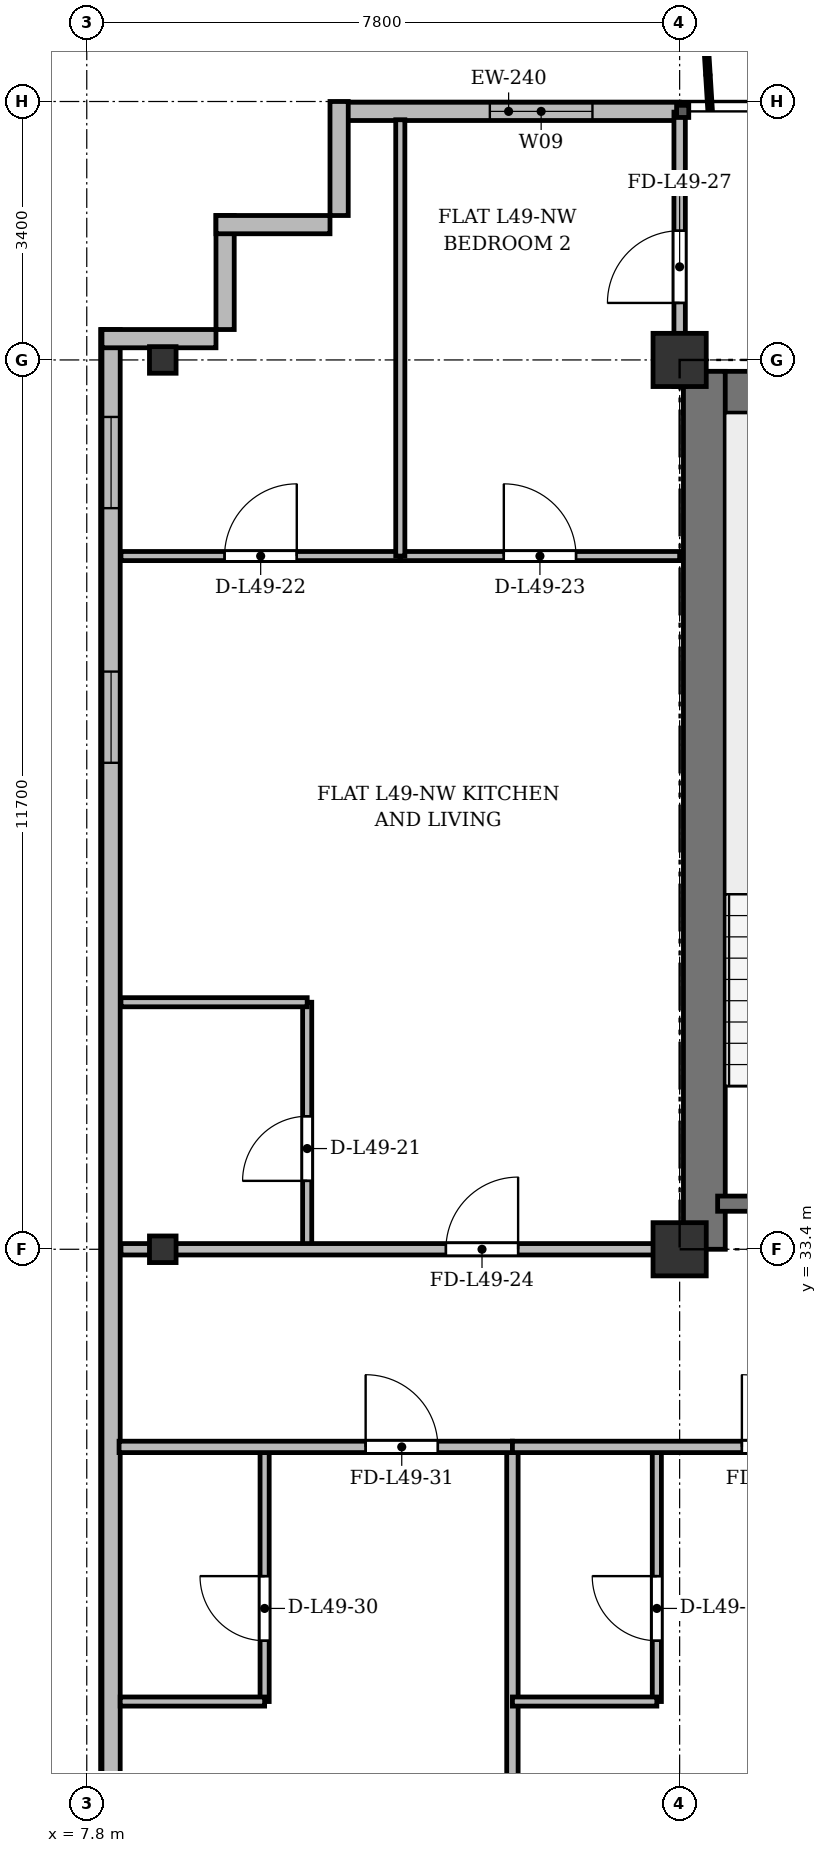
"""IFC4 building model, lengths in metres.
Left out: names, types, materials, properties, quantities, classifications, styles, units other than length and angle.
Written with IfcOpenShell. Run it as: python <this file> out.ifc"""

import sys

from ifc_helpers import new_model, si_unit, direction, frame, frame_2d, origin, origin_2d, place, context, subcontext, project, spatial, rectangle, i_section, extrude, source, transform, mapped, element, fill, save


model = new_model("IFC4")
c1 = context("Model", 3, precision=1e-05, world=origin(), true_north=direction((0.0, 1.0)))
c2 = subcontext(c1, "Body", "Model", "MODEL_VIEW")
j1 = project(units=[si_unit("LENGTHUNIT", "METRE"), si_unit("PLANEANGLEUNIT", "RADIAN")], contexts=[c1])
p1 = place(None, origin())
s1 = spatial("IfcSite", under=j1, at=p1, CompositionType="ELEMENT")
p2 = place(p1, origin())
s2 = spatial("IfcBuilding", under=s1, at=p2, CompositionType="ELEMENT")
p3 = place(p2, frame((0.0, 0.0, 190.5)))
s3 = spatial("IfcBuildingStorey", under=s2, at=p3, CompositionType="ELEMENT", Elevation=190.5)
m1 = source(origin(), c2, "Body", "SweptSolid", [
    extrude(i_section(OverallWidth=0.35, OverallDepth=0.35, WebThickness=0.018, FlangeThickness=0.028, at=origin_2d()), origin(), (0.0, 0.0, 1.0), 3.6),
])
for number, where, z_axis, x_axis in (
    (1, (8.8, 33.4, 0.0), (0.0, 0.0, 1.0), (1.0, 0.0, 0.0)),
    (2, (8.8, 45.1, 0.0), (0.0, 0.0, 1.0), (1.0, 0.0, 0.0)),
):
    element("IfcColumn", number, at=place(p3, frame(where, z_axis=z_axis, x_axis=x_axis)), inside=s3, PredefinedType="COLUMN", context=c2, shape_type="MappedRepresentation", body=[
        mapped(m1, transform((0.0, 0.0, 0.0), x_axis=(1.0, 0.0, 0.0), y_axis=(0.0, 1.0, 0.0), z_axis=(0.0, 0.0, 1.0), scale=1.0)),
    ])
m2 = source(origin(), c2, "Body", "SweptSolid", [
    extrude(rectangle(XDim=0.7, YDim=0.7, at=origin_2d()), origin(), (0.0, 0.0, 1.0), 3.6),
])
for number, where, z_axis, x_axis in (
    (3, (15.6, 33.4, 0.0), (0.0, 0.0, 1.0), (1.0, 0.0, 0.0)),
    (4, (15.6, 45.1, 0.0), (0.0, 0.0, 1.0), (1.0, 0.0, 0.0)),
):
    element("IfcColumn", number, at=place(p3, frame(where, z_axis=z_axis, x_axis=x_axis)), inside=s3, PredefinedType="COLUMN", context=c2, shape_type="MappedRepresentation", body=[
        mapped(m2, transform((0.0, 0.0, 0.0), x_axis=(1.0, 0.0, 0.0), y_axis=(0.0, 1.0, 0.0), z_axis=(0.0, 0.0, 1.0), scale=1.0)),
    ])
p4 = place(p3, frame((11.1, 48.37, 0.0), z_axis=(0.0, 0.0, 1.0), x_axis=(1.0, 0.0, 0.0)))
e5 = element("IfcWall", 5, at=p4, inside=s3, PredefinedType="SOLIDWALL", context=c2, shape_type="SweptSolid", body=[
    extrude(rectangle(XDim=4.5, YDim=0.24, at=frame_2d((2.25, 0.0))), origin(), (0.0, 0.0, 1.0), 3.36),
])
p5 = place(p4, frame((2.003, 0.0, 0.9)))
e6 = element("IfcOpeningElement", 6, at=p5, cuts=e5, PredefinedType="OPENING", context=c2, shape_type="SweptSolid", body=[
    extrude(rectangle(XDim=1.35, YDim=1.5, at=frame_2d((0.675, 0.75))), frame((0.0, 0.13, 0.0), z_axis=(0.0, -1.0, 0.0), x_axis=(1.0, 0.0, 0.0)), (0.0, 0.0, 1.0), 0.26),
])
p6 = place(p3, frame((8.12, 6.4, 0.0), z_axis=(0.0, 0.0, 1.0), x_axis=(0.0, 1.0, 0.0)))
e7 = element("IfcWall", 7, at=p6, inside=s3, PredefinedType="SOLIDWALL", context=c2, shape_type="SweptSolid", body=[
    extrude(rectangle(XDim=39.1, YDim=0.24, at=frame_2d((19.55, 0.0))), origin(), (0.0, 0.0, 1.0), 3.36),
])
p7 = place(p6, frame((1.45, 0.0, 0.92)))
e8 = element("IfcOpeningElement", 8, at=p7, cuts=e7, PredefinedType="OPENING", context=c2, shape_type="SweptSolid", body=[
    extrude(rectangle(XDim=1.2, YDim=1.65, at=frame_2d((0.6, 0.825))), frame((0.0, 0.13, 0.0), z_axis=(0.0, -1.0, 0.0), x_axis=(1.0, 0.0, 0.0)), (0.0, 0.0, 1.0), 0.26),
])
p8 = place(p6, frame((3.8, 0.0, 0.92)))
e9 = element("IfcOpeningElement", 9, at=p8, cuts=e7, PredefinedType="OPENING", context=c2, shape_type="SweptSolid", body=[
    extrude(rectangle(XDim=2.4, YDim=2.1, at=frame_2d((1.2, 1.05))), frame((0.0, 0.13, 0.0), z_axis=(0.0, -1.0, 0.0), x_axis=(1.0, 0.0, 0.0)), (0.0, 0.0, 1.0), 0.26),
])
p9 = place(p6, frame((8.0, 0.0, 0.92)))
e10 = element("IfcOpeningElement", 10, at=p9, cuts=e7, PredefinedType="OPENING", context=c2, shape_type="SweptSolid", body=[
    extrude(rectangle(XDim=2.4, YDim=2.1, at=frame_2d((1.2, 1.05))), frame((0.0, 0.13, 0.0), z_axis=(0.0, -1.0, 0.0), x_axis=(1.0, 0.0, 0.0)), (0.0, 0.0, 1.0), 0.26),
])
p10 = place(p6, frame((15.2, 0.0, 0.92)))
e11 = element("IfcOpeningElement", 11, at=p10, cuts=e7, PredefinedType="OPENING", context=c2, shape_type="SweptSolid", body=[
    extrude(rectangle(XDim=2.4, YDim=2.1, at=frame_2d((1.2, 1.05))), frame((0.0, 0.13, 0.0), z_axis=(0.0, -1.0, 0.0), x_axis=(1.0, 0.0, 0.0)), (0.0, 0.0, 1.0), 0.26),
])
p11 = place(p6, frame((33.4, 0.0, 0.92)))
e12 = element("IfcOpeningElement", 12, at=p11, cuts=e7, PredefinedType="OPENING", context=c2, shape_type="SweptSolid", body=[
    extrude(rectangle(XDim=1.2, YDim=1.65, at=frame_2d((0.6, 0.825))), frame((0.0, 0.13, 0.0), z_axis=(0.0, -1.0, 0.0), x_axis=(1.0, 0.0, 0.0)), (0.0, 0.0, 1.0), 0.26),
])
p12 = place(p6, frame((36.75, 0.0, 0.92)))
e13 = element("IfcOpeningElement", 13, at=p12, cuts=e7, PredefinedType="OPENING", context=c2, shape_type="SweptSolid", body=[
    extrude(rectangle(XDim=1.2, YDim=1.65, at=frame_2d((0.6, 0.825))), frame((0.0, 0.13, 0.0), z_axis=(0.0, -1.0, 0.0), x_axis=(1.0, 0.0, 0.0)), (0.0, 0.0, 1.0), 0.26),
])
for number, where, z_axis, x_axis in (
    (14, (8.0, 45.38, 0.0), (0.0, 0.0, 1.0), (1.0, 0.0, 0.0)),
    (15, (9.62, 45.5, 0.0), (0.0, 0.0, 1.0), (0.0, 1.0, 0.0)),
    (16, (9.5, 46.88, 0.0), (0.0, 0.0, 1.0), (1.0, 0.0, 0.0)),
    (17, (11.12, 47.0, 0.0), (0.0, 0.0, 1.0), (0.0, 1.0, 0.0)),
):
    element("IfcWall", number, at=place(p3, frame(where, z_axis=z_axis, x_axis=x_axis)), inside=s3, PredefinedType="SOLIDWALL", context=c2, shape_type="SweptSolid", body=[
        extrude(rectangle(XDim=1.5, YDim=0.24, at=frame_2d((0.75, 0.0))), origin(), (0.0, 0.0, 1.0), 3.36),
    ])
p13 = place(p3, frame((15.65, 44.675, 0.0), z_axis=(0.0, 0.0, 1.0), x_axis=(1.0, 0.0, 0.0)))
e18 = element("IfcWall", 18, at=p13, inside=s3, PredefinedType="SHEAR", context=c2, shape_type="SweptSolid", body=[
    extrude(rectangle(XDim=43.1, YDim=0.55, at=frame_2d((21.55, 0.0))), origin(), (0.0, 0.0, 1.0), 3.36),
])
p14 = place(p3, frame((15.925, 33.4, 0.0), z_axis=(0.0, 0.0, 1.0), x_axis=(0.0, 1.0, 0.0)))
e19 = element("IfcWall", 19, at=p14, inside=s3, PredefinedType="SHEAR", context=c2, shape_type="SweptSolid", body=[
    extrude(rectangle(XDim=11.55, YDim=0.55, at=frame_2d((5.775, 0.0))), origin(), (0.0, 0.0, 1.0), 3.36),
])
p15 = place(p3, frame((16.1, 34.0, 0.0), z_axis=(0.0, 0.0, 1.0), x_axis=(1.0, 0.0, 0.0)))
e20 = element("IfcWall", 20, at=p15, inside=s3, PredefinedType="SHEAR", context=c2, shape_type="SweptSolid", body=[
    extrude(rectangle(XDim=3.4, YDim=0.2, at=frame_2d((1.7, 0.0))), origin(), (0.0, 0.0, 1.0), 3.36),
])
p16 = place(p3, frame((10.7, 33.4, 0.0), z_axis=(0.0, 0.0, 1.0), x_axis=(0.0, 1.0, 0.0)))
e21 = element("IfcWall", 21, at=p16, inside=s3, PredefinedType="PARTITIONING", context=c2, shape_type="SweptSolid", body=[
    extrude(rectangle(XDim=3.25, YDim=0.12, at=frame_2d((1.625, 0.0))), origin(), (0.0, 0.0, 1.0), 2.91),
])
p17 = place(p16, frame((0.9, 0.0, 0.0)))
e22 = element("IfcOpeningElement", 22, at=p17, cuts=e21, PredefinedType="OPENING", context=c2, shape_type="SweptSolid", body=[
    extrude(rectangle(XDim=0.85, YDim=2.1, at=frame_2d((0.425, 1.05))), frame((0.0, 0.07, 0.0), z_axis=(0.0, -1.0, 0.0), x_axis=(1.0, 0.0, 0.0)), (0.0, 0.0, 1.0), 0.14),
])
p18 = place(p3, frame((8.25, 36.65, 0.0), z_axis=(0.0, 0.0, 1.0), x_axis=(1.0, 0.0, 0.0)))
e23 = element("IfcWall", 23, at=p18, inside=s3, PredefinedType="PARTITIONING", context=c2, shape_type="SweptSolid", body=[
    extrude(rectangle(XDim=2.45, YDim=0.12, at=frame_2d((1.225, 0.0))), origin(), (0.0, 0.0, 1.0), 2.86),
])
p19 = place(p3, frame((8.25, 42.52, 0.0), z_axis=(0.0, 0.0, 1.0), x_axis=(1.0, 0.0, 0.0)))
e24 = element("IfcWall", 24, at=p19, inside=s3, PredefinedType="PARTITIONING", context=c2, shape_type="SweptSolid", body=[
    extrude(rectangle(XDim=3.675, YDim=0.12, at=frame_2d((1.837, 0.0))), origin(), (0.0, 0.0, 1.0), 2.86),
])
p20 = place(p19, frame((1.363, 0.0, 0.0)))
e25 = element("IfcOpeningElement", 25, at=p20, cuts=e24, PredefinedType="OPENING", context=c2, shape_type="SweptSolid", body=[
    extrude(rectangle(XDim=0.95, YDim=2.15, at=frame_2d((0.475, 1.075))), frame((0.0, 0.07, 0.0), z_axis=(0.0, -1.0, 0.0), x_axis=(1.0, 0.0, 0.0)), (0.0, 0.0, 1.0), 0.14),
])
p21 = place(p3, frame((11.925, 42.52, 0.0), z_axis=(0.0, 0.0, 1.0), x_axis=(1.0, 0.0, 0.0)))
e26 = element("IfcWall", 26, at=p21, inside=s3, PredefinedType="PARTITIONING", context=c2, shape_type="SweptSolid", body=[
    extrude(rectangle(XDim=3.675, YDim=0.12, at=frame_2d((1.837, 0.0))), origin(), (0.0, 0.0, 1.0), 2.86),
])
p22 = place(p21, frame((1.362, 0.0, 0.0)))
e27 = element("IfcOpeningElement", 27, at=p22, cuts=e26, PredefinedType="OPENING", context=c2, shape_type="SweptSolid", body=[
    extrude(rectangle(XDim=0.95, YDim=2.15, at=frame_2d((0.475, 1.075))), frame((0.0, 0.07, 0.0), z_axis=(0.0, -1.0, 0.0), x_axis=(1.0, 0.0, 0.0)), (0.0, 0.0, 1.0), 0.14),
])
p23 = place(p3, frame((11.925, 42.52, 0.0), z_axis=(0.0, 0.0, 1.0), x_axis=(0.0, 1.0, 0.0)))
e28 = element("IfcWall", 28, at=p23, inside=s3, PredefinedType="PARTITIONING", context=c2, shape_type="SweptSolid", body=[
    extrude(rectangle(XDim=5.74, YDim=0.12, at=frame_2d((2.87, 0.0))), origin(), (0.0, 0.0, 1.0), 2.91),
])
p24 = place(p3, frame((8.25, 33.4, 0.0), z_axis=(0.0, 0.0, 1.0), x_axis=(1.0, 0.0, 0.0)))
e29 = element("IfcWall", 29, at=p24, inside=s3, PredefinedType="PARTITIONING", context=c2, shape_type="SweptSolid", body=[
    extrude(rectangle(XDim=7.35, YDim=0.15, at=frame_2d((3.675, 0.0))), origin(), (0.0, 0.0, 1.0), 2.91),
])
p25 = place(p24, frame((4.275, 0.0, 0.0)))
e30 = element("IfcOpeningElement", 30, at=p25, cuts=e29, PredefinedType="OPENING", context=c2, shape_type="SweptSolid", body=[
    extrude(rectangle(XDim=0.95, YDim=2.15, at=frame_2d((0.475, 1.075))), frame((0.0, 0.085, 0.0), z_axis=(0.0, -1.0, 0.0), x_axis=(1.0, 0.0, 0.0)), (0.0, 0.0, 1.0), 0.17),
])
p26 = place(p3, frame((15.6, 44.75, 0.0), z_axis=(0.0, 0.0, 1.0), x_axis=(0.0, 1.0, 0.0)))
e31 = element("IfcWall", 31, at=p26, inside=s3, PredefinedType="PARTITIONING", context=c2, shape_type="SweptSolid", body=[
    extrude(rectangle(XDim=3.61, YDim=0.15, at=frame_2d((1.805, 0.0))), origin(), (0.0, 0.0, 1.0), 2.86),
])
p27 = place(p26, frame((1.1, 0.0, 0.0)))
e32 = element("IfcOpeningElement", 32, at=p27, cuts=e31, PredefinedType="OPENING", context=c2, shape_type="SweptSolid", body=[
    extrude(rectangle(XDim=0.95, YDim=2.15, at=frame_2d((0.475, 1.075))), frame((0.0, 0.085, 0.0), z_axis=(0.0, -1.0, 0.0), x_axis=(1.0, 0.0, 0.0)), (0.0, 0.0, 1.0), 0.17),
])
p28 = place(p3, frame((13.4, 3.625, 0.0), z_axis=(0.0, 0.0, 1.0), x_axis=(0.0, 1.0, 0.0)))
e33 = element("IfcWall", 33, at=p28, inside=s3, PredefinedType="PARTITIONING", context=c2, shape_type="SweptSolid", body=[
    extrude(rectangle(XDim=27.175, YDim=0.15, at=frame_2d((13.587, 0.0))), origin(), (0.0, 0.0, 1.0), 2.91),
])
p29 = place(p3, frame((10.14, 27.45, 0.0), z_axis=(0.0, 0.0, 1.0), x_axis=(0.0, 1.0, 0.0)))
e34 = element("IfcWall", 34, at=p29, inside=s3, PredefinedType="PARTITIONING", context=c2, shape_type="SweptSolid", body=[
    extrude(rectangle(XDim=3.35, YDim=0.12, at=frame_2d((1.675, 0.0))), origin(), (0.0, 0.0, 1.0), 3.36),
])
p30 = place(p29, frame((0.8, 0.0, 0.0)))
e35 = element("IfcOpeningElement", 35, at=p30, cuts=e34, PredefinedType="OPENING", context=c2, shape_type="SweptSolid", body=[
    extrude(rectangle(XDim=0.85, YDim=2.1, at=frame_2d((0.425, 1.05))), frame((0.0, 0.07, 0.0), z_axis=(0.0, -1.0, 0.0), x_axis=(1.0, 0.0, 0.0)), (0.0, 0.0, 1.0), 0.14),
])
p31 = place(p3, frame((8.24, 27.45, 0.0), z_axis=(0.0, 0.0, 1.0), x_axis=(1.0, 0.0, 0.0)))
e36 = element("IfcWall", 36, at=p31, inside=s3, PredefinedType="PARTITIONING", context=c2, shape_type="SweptSolid", body=[
    extrude(rectangle(XDim=1.9, YDim=0.12, at=frame_2d((0.95, 0.0))), origin(), (0.0, 0.0, 1.0), 2.86),
])
p32 = place(p3, frame((8.225, 30.8, 0.0), z_axis=(0.0, 0.0, 1.0), x_axis=(1.0, 0.0, 0.0)))
e37 = element("IfcWall", 37, at=p32, inside=s3, PredefinedType="PARTITIONING", context=c2, shape_type="SweptSolid", body=[
    extrude(rectangle(XDim=5.175, YDim=0.15, at=frame_2d((2.587, 0.0))), origin(), (0.0, 0.0, 1.0), 2.86),
])
p33 = place(p32, frame((3.244, 0.0, 0.0)))
e38 = element("IfcOpeningElement", 38, at=p33, cuts=e37, PredefinedType="OPENING", context=c2, shape_type="SweptSolid", body=[
    extrude(rectangle(XDim=0.95, YDim=2.15, at=frame_2d((0.475, 1.075))), frame((0.0, 0.085, 0.0), z_axis=(0.0, -1.0, 0.0), x_axis=(1.0, 0.0, 0.0)), (0.0, 0.0, 1.0), 0.17),
])
p34 = place(p3, frame((15.3, 27.45, 0.0), z_axis=(0.0, 0.0, 1.0), x_axis=(0.0, 1.0, 0.0)))
e39 = element("IfcWall", 39, at=p34, inside=s3, PredefinedType="PARTITIONING", context=c2, shape_type="SweptSolid", body=[
    extrude(rectangle(XDim=3.35, YDim=0.12, at=frame_2d((1.675, 0.0))), origin(), (0.0, 0.0, 1.0), 3.36),
])
p35 = place(p34, frame((0.8, 0.0, 0.0)))
e40 = element("IfcOpeningElement", 40, at=p35, cuts=e39, PredefinedType="OPENING", context=c2, shape_type="SweptSolid", body=[
    extrude(rectangle(XDim=0.85, YDim=2.1, at=frame_2d((0.425, 1.05))), frame((0.0, 0.07, 0.0), z_axis=(0.0, -1.0, 0.0), x_axis=(1.0, 0.0, 0.0)), (0.0, 0.0, 1.0), 0.14),
])
p36 = place(p3, frame((13.4, 27.45, 0.0), z_axis=(0.0, 0.0, 1.0), x_axis=(1.0, 0.0, 0.0)))
e41 = element("IfcWall", 41, at=p36, inside=s3, PredefinedType="PARTITIONING", context=c2, shape_type="SweptSolid", body=[
    extrude(rectangle(XDim=1.9, YDim=0.12, at=frame_2d((0.95, 0.0))), origin(), (0.0, 0.0, 1.0), 3.36),
])
p37 = place(p3, frame((13.4, 30.8, 0.0), z_axis=(0.0, 0.0, 1.0), x_axis=(1.0, 0.0, 0.0)))
e42 = element("IfcWall", 42, at=p37, inside=s3, PredefinedType="PARTITIONING", context=c2, shape_type="SweptSolid", body=[
    extrude(rectangle(XDim=4.8, YDim=0.15, at=frame_2d((2.4, 0.0))), origin(), (0.0, 0.0, 1.0), 2.86),
])
p38 = place(p37, frame((3.019, 0.0, 0.0)))
e43 = element("IfcOpeningElement", 43, at=p38, cuts=e42, PredefinedType="OPENING", context=c2, shape_type="SweptSolid", body=[
    extrude(rectangle(XDim=0.95, YDim=2.15, at=frame_2d((0.475, 1.075))), frame((0.0, 0.085, 0.0), z_axis=(0.0, -1.0, 0.0), x_axis=(1.0, 0.0, 0.0)), (0.0, 0.0, 1.0), 0.17),
])
m3 = source(origin(), c2, "Body", "SweptSolid", [
    extrude(rectangle(XDim=1.35, YDim=1.5, at=frame_2d((0.675, 0.75))), frame((0.0, 0.03, 0.0), z_axis=(0.0, -1.0, 0.0), x_axis=(1.0, 0.0, 0.0)), (0.0, 0.0, 1.0), 0.06),
])
p39 = place(p5, origin())
e44 = element("IfcWindow", 44, at=p39, inside=s3, PartitioningType="SINGLE_PANEL", PredefinedType="WINDOW", context=c2, shape_type="MappedRepresentation", body=[
    mapped(m3, transform((0.0, 0.0, 0.0), x_axis=(1.0, 0.0, 0.0), y_axis=(0.0, 1.0, 0.0), z_axis=(0.0, 0.0, 1.0), scale=1.0)),
])
fill(e6, e44)
m4 = source(origin(), c2, "Body", "SweptSolid", [
    extrude(rectangle(XDim=1.2, YDim=1.65, at=frame_2d((0.6, 0.825))), frame((0.0, 0.03, 0.0), z_axis=(0.0, -1.0, 0.0), x_axis=(1.0, 0.0, 0.0)), (0.0, 0.0, 1.0), 0.06),
])
p40 = place(p11, origin())
e45 = element("IfcWindow", 45, at=p40, inside=s3, PartitioningType="SINGLE_PANEL", PredefinedType="WINDOW", context=c2, shape_type="MappedRepresentation", body=[
    mapped(m4, transform((0.0, 0.0, 0.0), x_axis=(1.0, 0.0, 0.0), y_axis=(0.0, 1.0, 0.0), z_axis=(0.0, 0.0, 1.0), scale=1.0)),
])
fill(e12, e45)
p41 = place(p12, origin())
e46 = element("IfcWindow", 46, at=p41, inside=s3, PartitioningType="SINGLE_PANEL", PredefinedType="WINDOW", context=c2, shape_type="MappedRepresentation", body=[
    mapped(m4, transform((0.0, 0.0, 0.0), x_axis=(1.0, 0.0, 0.0), y_axis=(0.0, 1.0, 0.0), z_axis=(0.0, 0.0, 1.0), scale=1.0)),
])
fill(e13, e46)
m5 = source(origin(), c2, "Body", "SweptSolid", [
    extrude(rectangle(XDim=0.85, YDim=2.1, at=frame_2d((0.425, 1.05))), frame((0.0, 0.025, 0.0), z_axis=(0.0, -1.0, 0.0), x_axis=(1.0, 0.0, 0.0)), (0.0, 0.0, 1.0), 0.05),
])
p42 = place(p17, origin())
e47 = element("IfcDoor", 47, at=p42, inside=s3, OperationType="SINGLE_SWING_LEFT", PredefinedType="DOOR", context=c2, shape_type="MappedRepresentation", body=[
    mapped(m5, transform((0.0, 0.0, 0.0), x_axis=(1.0, 0.0, 0.0), y_axis=(0.0, 1.0, 0.0), z_axis=(0.0, 0.0, 1.0), scale=1.0)),
])
fill(e22, e47)
m6 = source(origin(), c2, "Body", "SweptSolid", [
    extrude(rectangle(XDim=0.95, YDim=2.15, at=frame_2d((0.475, 1.075))), frame((0.0, 0.025, 0.0), z_axis=(0.0, -1.0, 0.0), x_axis=(1.0, 0.0, 0.0)), (0.0, 0.0, 1.0), 0.05),
])
p43 = place(p20, origin())
e48 = element("IfcDoor", 48, at=p43, inside=s3, OperationType="SINGLE_SWING_RIGHT", PredefinedType="DOOR", context=c2, shape_type="MappedRepresentation", body=[
    mapped(m6, transform((0.0, 0.0, 0.0), x_axis=(1.0, 0.0, 0.0), y_axis=(0.0, 1.0, 0.0), z_axis=(0.0, 0.0, 1.0), scale=1.0)),
])
fill(e25, e48)
p44 = place(p22, origin())
e49 = element("IfcDoor", 49, at=p44, inside=s3, OperationType="SINGLE_SWING_LEFT", PredefinedType="DOOR", context=c2, shape_type="MappedRepresentation", body=[
    mapped(m6, transform((0.0, 0.0, 0.0), x_axis=(1.0, 0.0, 0.0), y_axis=(0.0, 1.0, 0.0), z_axis=(0.0, 0.0, 1.0), scale=1.0)),
])
fill(e27, e49)
p45 = place(p25, origin())
e50 = element("IfcDoor", 50, at=p45, inside=s3, OperationType="SINGLE_SWING_RIGHT", PredefinedType="DOOR", context=c2, shape_type="MappedRepresentation", body=[
    mapped(m6, transform((0.0, 0.0, 0.0), x_axis=(1.0, 0.0, 0.0), y_axis=(0.0, 1.0, 0.0), z_axis=(0.0, 0.0, 1.0), scale=1.0)),
])
fill(e30, e50)
p46 = place(p27, origin())
e51 = element("IfcDoor", 51, at=p46, inside=s3, OperationType="SINGLE_SWING_LEFT", PredefinedType="DOOR", context=c2, shape_type="MappedRepresentation", body=[
    mapped(m6, transform((0.0, 0.0, 0.0), x_axis=(1.0, 0.0, 0.0), y_axis=(0.0, 1.0, 0.0), z_axis=(0.0, 0.0, 1.0), scale=1.0)),
])
fill(e32, e51)
p47 = place(p30, origin())
e52 = element("IfcDoor", 52, at=p47, inside=s3, OperationType="SINGLE_SWING_RIGHT", PredefinedType="DOOR", context=c2, shape_type="MappedRepresentation", body=[
    mapped(m5, transform((0.0, 0.0, 0.0), x_axis=(1.0, 0.0, 0.0), y_axis=(0.0, 1.0, 0.0), z_axis=(0.0, 0.0, 1.0), scale=1.0)),
])
fill(e35, e52)
p48 = place(p33, origin())
e53 = element("IfcDoor", 53, at=p48, inside=s3, OperationType="SINGLE_SWING_LEFT", PredefinedType="DOOR", context=c2, shape_type="MappedRepresentation", body=[
    mapped(m6, transform((0.0, 0.0, 0.0), x_axis=(1.0, 0.0, 0.0), y_axis=(0.0, 1.0, 0.0), z_axis=(0.0, 0.0, 1.0), scale=1.0)),
])
fill(e38, e53)
p49 = place(p35, origin())
e54 = element("IfcDoor", 54, at=p49, inside=s3, OperationType="SINGLE_SWING_RIGHT", PredefinedType="DOOR", context=c2, shape_type="MappedRepresentation", body=[
    mapped(m5, transform((0.0, 0.0, 0.0), x_axis=(1.0, 0.0, 0.0), y_axis=(0.0, 1.0, 0.0), z_axis=(0.0, 0.0, 1.0), scale=1.0)),
])
fill(e40, e54)
p50 = place(p38, origin())
e55 = element("IfcDoor", 55, at=p50, inside=s3, OperationType="SINGLE_SWING_LEFT", PredefinedType="DOOR", context=c2, shape_type="MappedRepresentation", body=[
    mapped(m6, transform((0.0, 0.0, 0.0), x_axis=(1.0, 0.0, 0.0), y_axis=(0.0, 1.0, 0.0), z_axis=(0.0, 0.0, 1.0), scale=1.0)),
])
fill(e43, e55)
save(model, sys.argv[1])
